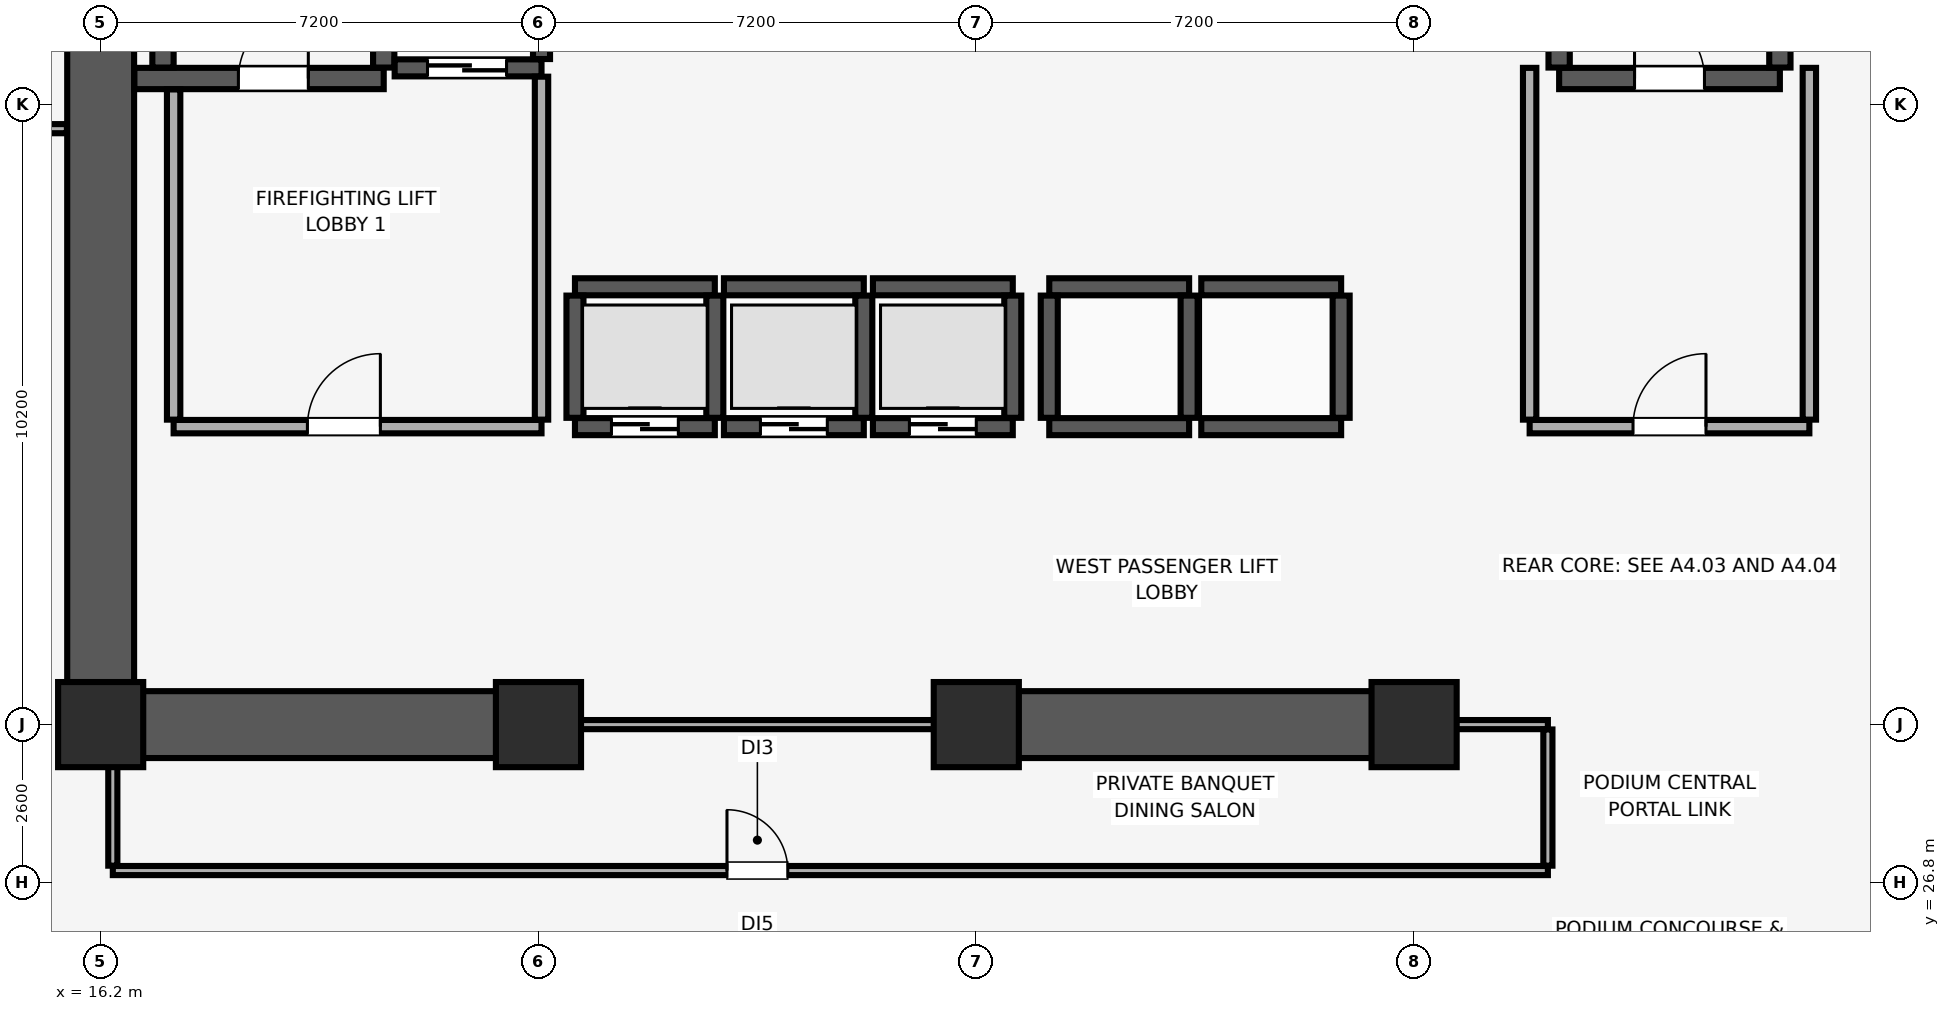
"""IFC4 building model, lengths in metres.
Left out: names, types, materials, properties, quantities, classifications, styles, units other than length and angle.
Written with IfcOpenShell. Run it as: python <this file> out.ifc"""

import sys

from ifc_helpers import new_model, si_unit, direction, frame, frame_2d, origin, origin_2d, place, context, subcontext, project, spatial, rectangle, extrude, element, fill, save


model = new_model("IFC4")
c1 = context("Model", 3, precision=1e-05, world=origin(), true_north=direction((0.0, 1.0)))
c2 = subcontext(c1, "Body", "Model", "MODEL_VIEW")
j1 = project(units=[si_unit("LENGTHUNIT", "METRE"), si_unit("PLANEANGLEUNIT", "RADIAN")], contexts=[c1])
p1 = place(None, origin())
s1 = spatial("IfcSite", under=j1, at=p1, CompositionType="ELEMENT")
p2 = place(p1, origin())
s2 = spatial("IfcBuilding", under=s1, at=p2, CompositionType="ELEMENT")
p3 = place(p2, frame((0.0, 0.0, 14.0)))
s3 = spatial("IfcBuildingStorey", under=s2, at=p3, CompositionType="ELEMENT", Elevation=14.0)
for number, where, z_axis, x_axis in (
    (1, (16.2, 29.4, 0.0), (0.0, 0.0, 1.0), (1.0, 0.0, 0.0)),
    (2, (23.4, 29.4, 0.0), (0.0, 0.0, 1.0), (1.0, 0.0, 0.0)),
    (3, (30.6, 29.4, 0.0), (0.0, 0.0, 1.0), (1.0, 0.0, 0.0)),
    (4, (37.8, 29.4, 0.0), (0.0, 0.0, 1.0), (1.0, 0.0, 0.0)),
):
    element("IfcColumn", number, at=place(p3, frame(where, z_axis=z_axis, x_axis=x_axis)), inside=s3, PredefinedType="COLUMN", context=c2, shape_type="SweptSolid", body=[
        extrude(rectangle(XDim=1.4, YDim=1.4, at=origin_2d()), origin(), (0.0, 0.0, 1.0), 5.08),
    ])
p4 = place(p3, frame((16.2, 29.4, 0.0), z_axis=(0.0, 0.0, 1.0), x_axis=(0.0, 1.0, 0.0)))
e5 = element("IfcWall", 5, at=p4, inside=s3, PredefinedType="SHEAR", context=c2, shape_type="SweptSolid", body=[
    extrude(rectangle(XDim=19.2, YDim=1.1, at=frame_2d((9.6, 0.0))), origin(), (0.0, 0.0, 1.0), 5.08),
])
p5 = place(p3, frame((16.755, 29.4, 0.0), z_axis=(0.0, 0.0, 1.0), x_axis=(1.0, 0.0, 0.0)))
e6 = element("IfcWall", 6, at=p5, inside=s3, PredefinedType="SHEAR", context=c2, shape_type="SweptSolid", body=[
    extrude(rectangle(XDim=6.845, YDim=1.1, at=frame_2d((3.423, 0.0))), origin(), (0.0, 0.0, 1.0), 5.08),
])
p6 = place(p3, frame((30.4, 29.4, 0.0), z_axis=(0.0, 0.0, 1.0), x_axis=(1.0, 0.0, 0.0)))
e7 = element("IfcWall", 7, at=p6, inside=s3, PredefinedType="SHEAR", context=c2, shape_type="SweptSolid", body=[
    extrude(rectangle(XDim=7.6, YDim=1.1, at=frame_2d((3.8, 0.0))), origin(), (0.0, 0.0, 1.0), 5.08),
])
p7 = place(p3, frame((16.755, 40.025, 0.0), z_axis=(0.0, 0.0, 1.0), x_axis=(1.0, 0.0, 0.0)))
e8 = element("IfcWall", 8, at=p7, inside=s3, PredefinedType="SHEAR", context=c2, shape_type="SweptSolid", body=[
    extrude(rectangle(XDim=4.1, YDim=0.35, at=frame_2d((2.05, 0.0))), origin(), (0.0, 0.0, 1.0), 5.08),
])
p8 = place(p7, frame((1.71, 0.0, 0.0)))
e9 = element("IfcOpeningElement", 9, at=p8, cuts=e8, PredefinedType="OPENING", context=c2, shape_type="SweptSolid", body=[
    extrude(rectangle(XDim=1.15, YDim=2.15, at=frame_2d((0.575, 1.075))), frame((0.0, 0.185, 0.0), z_axis=(0.0, -1.0, 0.0), x_axis=(1.0, 0.0, 0.0)), (0.0, 0.0, 1.0), 0.37),
])
for number, where, z_axis, x_axis in (
    (10, (17.225, 40.205, 0.0), (0.0, 0.0, 1.0), (0.0, 1.0, 0.0)),
    (11, (20.855, 40.205, 0.0), (0.0, 0.0, 1.0), (0.0, 1.0, 0.0)),
):
    element("IfcWall", number, at=place(p3, frame(where, z_axis=z_axis, x_axis=x_axis)), inside=s3, PredefinedType="SHEAR", context=c2, shape_type="SweptSolid", body=[
        extrude(rectangle(XDim=8.09, YDim=0.35, at=frame_2d((4.045, 0.0))), origin(), (0.0, 0.0, 1.0), 5.08),
    ])
p9 = place(p3, frame((40.185, 40.025, 0.0), z_axis=(0.0, 0.0, 1.0), x_axis=(1.0, 0.0, 0.0)))
e12 = element("IfcWall", 12, at=p9, inside=s3, PredefinedType="SHEAR", context=c2, shape_type="SweptSolid", body=[
    extrude(rectangle(XDim=3.63, YDim=0.35, at=frame_2d((1.815, 0.0))), origin(), (0.0, 0.0, 1.0), 5.08),
])
p10 = place(p9, frame((1.24, 0.0, 0.0)))
e13 = element("IfcOpeningElement", 13, at=p10, cuts=e12, PredefinedType="OPENING", context=c2, shape_type="SweptSolid", body=[
    extrude(rectangle(XDim=1.15, YDim=2.15, at=frame_2d((0.575, 1.075))), frame((0.0, 0.185, 0.0), z_axis=(0.0, -1.0, 0.0), x_axis=(1.0, 0.0, 0.0)), (0.0, 0.0, 1.0), 0.37),
])
for number, where, z_axis, x_axis in (
    (14, (40.185, 40.205, 0.0), (0.0, 0.0, 1.0), (0.0, 1.0, 0.0)),
    (15, (43.815, 40.205, 0.0), (0.0, 0.0, 1.0), (0.0, 1.0, 0.0)),
):
    element("IfcWall", number, at=place(p3, frame(where, z_axis=z_axis, x_axis=x_axis)), inside=s3, PredefinedType="SHEAR", context=c2, shape_type="SweptSolid", body=[
        extrude(rectangle(XDim=8.09, YDim=0.35, at=frame_2d((4.045, 0.0))), origin(), (0.0, 0.0, 1.0), 5.08),
    ])
p11 = place(p3, frame((24.0, 34.3, 0.0), z_axis=(0.0, 0.0, 1.0), x_axis=(1.0, 0.0, 0.0)))
e16 = element("IfcWall", 16, at=p11, inside=s3, PredefinedType="SHEAR", context=c2, shape_type="SweptSolid", body=[
    extrude(rectangle(XDim=2.3, YDim=0.28, at=frame_2d((1.15, 0.0))), origin(), (0.0, 0.0, 1.0), 5.08),
])
p12 = place(p11, frame((0.6, 0.0, 0.0)))
e17 = element("IfcOpeningElement", 17, at=p12, cuts=e16, PredefinedType="OPENING", context=c2, shape_type="SweptSolid", body=[
    extrude(rectangle(XDim=1.1, YDim=2.2, at=frame_2d((0.55, 1.1))), frame((0.0, 0.15, 0.0), z_axis=(0.0, -1.0, 0.0), x_axis=(1.0, 0.0, 0.0)), (0.0, 0.0, 1.0), 0.3),
])
p13 = place(p3, frame((24.0, 36.6, 0.0), z_axis=(0.0, 0.0, 1.0), x_axis=(1.0, 0.0, 0.0)))
e18 = element("IfcWall", 18, at=p13, inside=s3, PredefinedType="SHEAR", context=c2, shape_type="SweptSolid", body=[
    extrude(rectangle(XDim=2.3, YDim=0.28, at=frame_2d((1.15, 0.0))), origin(), (0.0, 0.0, 1.0), 5.08),
])
for number, where, z_axis, x_axis in (
    (19, (24.0, 34.445, 0.0), (0.0, 0.0, 1.0), (0.0, 1.0, 0.0)),
    (20, (26.3, 34.445, 0.0), (0.0, 0.0, 1.0), (0.0, 1.0, 0.0)),
):
    element("IfcWall", number, at=place(p3, frame(where, z_axis=z_axis, x_axis=x_axis)), inside=s3, PredefinedType="SHEAR", context=c2, shape_type="SweptSolid", body=[
        extrude(rectangle(XDim=2.01, YDim=0.28, at=frame_2d((1.005, 0.0))), origin(), (0.0, 0.0, 1.0), 5.08),
    ])
p14 = place(p3, frame((26.45, 34.3, 0.0), z_axis=(0.0, 0.0, 1.0), x_axis=(1.0, 0.0, 0.0)))
e21 = element("IfcWall", 21, at=p14, inside=s3, PredefinedType="SHEAR", context=c2, shape_type="SweptSolid", body=[
    extrude(rectangle(XDim=2.3, YDim=0.28, at=frame_2d((1.15, 0.0))), origin(), (0.0, 0.0, 1.0), 5.08),
])
p15 = place(p14, frame((0.6, 0.0, 0.0)))
e22 = element("IfcOpeningElement", 22, at=p15, cuts=e21, PredefinedType="OPENING", context=c2, shape_type="SweptSolid", body=[
    extrude(rectangle(XDim=1.1, YDim=2.2, at=frame_2d((0.55, 1.1))), frame((0.0, 0.15, 0.0), z_axis=(0.0, -1.0, 0.0), x_axis=(1.0, 0.0, 0.0)), (0.0, 0.0, 1.0), 0.3),
])
p16 = place(p3, frame((26.45, 36.6, 0.0), z_axis=(0.0, 0.0, 1.0), x_axis=(1.0, 0.0, 0.0)))
e23 = element("IfcWall", 23, at=p16, inside=s3, PredefinedType="SHEAR", context=c2, shape_type="SweptSolid", body=[
    extrude(rectangle(XDim=2.3, YDim=0.28, at=frame_2d((1.15, 0.0))), origin(), (0.0, 0.0, 1.0), 5.08),
])
p17 = place(p3, frame((28.75, 34.445, 0.0), z_axis=(0.0, 0.0, 1.0), x_axis=(0.0, 1.0, 0.0)))
e24 = element("IfcWall", 24, at=p17, inside=s3, PredefinedType="SHEAR", context=c2, shape_type="SweptSolid", body=[
    extrude(rectangle(XDim=2.01, YDim=0.28, at=frame_2d((1.005, 0.0))), origin(), (0.0, 0.0, 1.0), 5.08),
])
p18 = place(p3, frame((28.9, 34.3, 0.0), z_axis=(0.0, 0.0, 1.0), x_axis=(1.0, 0.0, 0.0)))
e25 = element("IfcWall", 25, at=p18, inside=s3, PredefinedType="SHEAR", context=c2, shape_type="SweptSolid", body=[
    extrude(rectangle(XDim=2.3, YDim=0.28, at=frame_2d((1.15, 0.0))), origin(), (0.0, 0.0, 1.0), 5.08),
])
p19 = place(p18, frame((0.6, 0.0, 0.0)))
e26 = element("IfcOpeningElement", 26, at=p19, cuts=e25, PredefinedType="OPENING", context=c2, shape_type="SweptSolid", body=[
    extrude(rectangle(XDim=1.1, YDim=2.2, at=frame_2d((0.55, 1.1))), frame((0.0, 0.15, 0.0), z_axis=(0.0, -1.0, 0.0), x_axis=(1.0, 0.0, 0.0)), (0.0, 0.0, 1.0), 0.3),
])
p20 = place(p3, frame((28.9, 36.6, 0.0), z_axis=(0.0, 0.0, 1.0), x_axis=(1.0, 0.0, 0.0)))
e27 = element("IfcWall", 27, at=p20, inside=s3, PredefinedType="SHEAR", context=c2, shape_type="SweptSolid", body=[
    extrude(rectangle(XDim=2.3, YDim=0.28, at=frame_2d((1.15, 0.0))), origin(), (0.0, 0.0, 1.0), 5.08),
])
p21 = place(p3, frame((31.2, 34.445, 0.0), z_axis=(0.0, 0.0, 1.0), x_axis=(0.0, 1.0, 0.0)))
e28 = element("IfcWall", 28, at=p21, inside=s3, PredefinedType="SHEAR", context=c2, shape_type="SweptSolid", body=[
    extrude(rectangle(XDim=2.01, YDim=0.28, at=frame_2d((1.005, 0.0))), origin(), (0.0, 0.0, 1.0), 5.08),
])
for number, where, z_axis, x_axis in (
    (29, (31.8, 34.3, 0.0), (0.0, 0.0, 1.0), (1.0, 0.0, 0.0)),
    (30, (31.8, 36.6, 0.0), (0.0, 0.0, 1.0), (1.0, 0.0, 0.0)),
):
    element("IfcWall", number, at=place(p3, frame(where, z_axis=z_axis, x_axis=x_axis)), inside=s3, PredefinedType="SHEAR", context=c2, shape_type="SweptSolid", body=[
        extrude(rectangle(XDim=2.3, YDim=0.28, at=frame_2d((1.15, 0.0))), origin(), (0.0, 0.0, 1.0), 5.08),
    ])
for number, where, z_axis, x_axis in (
    (31, (31.8, 34.445, 0.0), (0.0, 0.0, 1.0), (0.0, 1.0, 0.0)),
    (32, (34.1, 34.445, 0.0), (0.0, 0.0, 1.0), (0.0, 1.0, 0.0)),
):
    element("IfcWall", number, at=place(p3, frame(where, z_axis=z_axis, x_axis=x_axis)), inside=s3, PredefinedType="SHEAR", context=c2, shape_type="SweptSolid", body=[
        extrude(rectangle(XDim=2.01, YDim=0.28, at=frame_2d((1.005, 0.0))), origin(), (0.0, 0.0, 1.0), 5.08),
    ])
for number, where, z_axis, x_axis in (
    (33, (34.3, 34.3, 0.0), (0.0, 0.0, 1.0), (1.0, 0.0, 0.0)),
    (34, (34.3, 36.6, 0.0), (0.0, 0.0, 1.0), (1.0, 0.0, 0.0)),
):
    element("IfcWall", number, at=place(p3, frame(where, z_axis=z_axis, x_axis=x_axis)), inside=s3, PredefinedType="SHEAR", context=c2, shape_type="SweptSolid", body=[
        extrude(rectangle(XDim=2.3, YDim=0.28, at=frame_2d((1.15, 0.0))), origin(), (0.0, 0.0, 1.0), 5.08),
    ])
p22 = place(p3, frame((36.6, 34.445, 0.0), z_axis=(0.0, 0.0, 1.0), x_axis=(0.0, 1.0, 0.0)))
e35 = element("IfcWall", 35, at=p22, inside=s3, PredefinedType="SHEAR", context=c2, shape_type="SweptSolid", body=[
    extrude(rectangle(XDim=2.01, YDim=0.28, at=frame_2d((1.005, 0.0))), origin(), (0.0, 0.0, 1.0), 5.08),
])
p23 = place(p3, frame((21.035, 40.2, 0.0), z_axis=(0.0, 0.0, 1.0), x_axis=(1.0, 0.0, 0.0)))
e36 = element("IfcWall", 36, at=p23, inside=s3, PredefinedType="SHEAR", context=c2, shape_type="SweptSolid", body=[
    extrude(rectangle(XDim=2.415, YDim=0.28, at=frame_2d((1.208, 0.0))), origin(), (0.0, 0.0, 1.0), 5.08),
])
p24 = place(p23, frame((0.54, 0.0, 0.0)))
e37 = element("IfcOpeningElement", 37, at=p24, cuts=e36, PredefinedType="OPENING", context=c2, shape_type="SweptSolid", body=[
    extrude(rectangle(XDim=1.3, YDim=2.3, at=frame_2d((0.65, 1.15))), frame((0.0, 0.15, 0.0), z_axis=(0.0, -1.0, 0.0), x_axis=(1.0, 0.0, 0.0)), (0.0, 0.0, 1.0), 0.3),
])
p25 = place(p3, frame((23.45, 40.345, 0.0), z_axis=(0.0, 0.0, 1.0), x_axis=(0.0, 1.0, 0.0)))
e38 = element("IfcWall", 38, at=p25, inside=s3, PredefinedType="SHEAR", context=c2, shape_type="SweptSolid", body=[
    extrude(rectangle(XDim=2.81, YDim=0.28, at=frame_2d((1.405, 0.0))), origin(), (0.0, 0.0, 1.0), 5.08),
])
p26 = place(p3, frame((17.4, 34.3, 0.0), z_axis=(0.0, 0.0, 1.0), x_axis=(1.0, 0.0, 0.0)))
e39 = element("IfcWall", 39, at=p26, inside=s3, PredefinedType="PARTITIONING", context=c2, shape_type="SweptSolid", body=[
    extrude(rectangle(XDim=6.05, YDim=0.22, at=frame_2d((3.025, 0.0))), origin(), (0.0, 0.0, 1.0), 5.08),
])
p27 = place(p26, frame((2.2, 0.0, 0.0)))
e40 = element("IfcOpeningElement", 40, at=p27, cuts=e39, PredefinedType="OPENING", context=c2, shape_type="SweptSolid", body=[
    extrude(rectangle(XDim=1.2, YDim=2.15, at=frame_2d((0.6, 1.075))), frame((0.0, 0.12, 0.0), z_axis=(0.0, -1.0, 0.0), x_axis=(1.0, 0.0, 0.0)), (0.0, 0.0, 1.0), 0.24),
])
p28 = place(p3, frame((17.4, 34.415, 0.0), z_axis=(0.0, 0.0, 1.0), x_axis=(0.0, 1.0, 0.0)))
e41 = element("IfcWall", 41, at=p28, inside=s3, PredefinedType="PARTITIONING", context=c2, shape_type="SweptSolid", body=[
    extrude(rectangle(XDim=5.43, YDim=0.22, at=frame_2d((2.715, 0.0))), origin(), (0.0, 0.0, 1.0), 5.08),
])
p29 = place(p3, frame((23.45, 34.415, 0.0), z_axis=(0.0, 0.0, 1.0), x_axis=(0.0, 1.0, 0.0)))
e42 = element("IfcWall", 42, at=p29, inside=s3, PredefinedType="PARTITIONING", context=c2, shape_type="SweptSolid", body=[
    extrude(rectangle(XDim=5.64, YDim=0.22, at=frame_2d((2.82, 0.0))), origin(), (0.0, 0.0, 1.0), 5.08),
])
p30 = place(p3, frame((39.7, 34.3, 0.0), z_axis=(0.0, 0.0, 1.0), x_axis=(1.0, 0.0, 0.0)))
e43 = element("IfcWall", 43, at=p30, inside=s3, PredefinedType="PARTITIONING", context=c2, shape_type="SweptSolid", body=[
    extrude(rectangle(XDim=4.6, YDim=0.22, at=frame_2d((2.3, 0.0))), origin(), (0.0, 0.0, 1.0), 5.08),
])
p31 = place(p30, frame((1.7, 0.0, 0.0)))
e44 = element("IfcOpeningElement", 44, at=p31, cuts=e43, PredefinedType="OPENING", context=c2, shape_type="SweptSolid", body=[
    extrude(rectangle(XDim=1.2, YDim=2.15, at=frame_2d((0.6, 1.075))), frame((0.0, 0.12, 0.0), z_axis=(0.0, -1.0, 0.0), x_axis=(1.0, 0.0, 0.0)), (0.0, 0.0, 1.0), 0.24),
])
for number, where, z_axis, x_axis in (
    (45, (39.7, 34.415, 0.0), (0.0, 0.0, 1.0), (0.0, 1.0, 0.0)),
    (46, (44.3, 34.415, 0.0), (0.0, 0.0, 1.0), (0.0, 1.0, 0.0)),
):
    element("IfcWall", number, at=place(p3, frame(where, z_axis=z_axis, x_axis=x_axis)), inside=s3, PredefinedType="PARTITIONING", context=c2, shape_type="SweptSolid", body=[
        extrude(rectangle(XDim=5.785, YDim=0.22, at=frame_2d((2.893, 0.0))), origin(), (0.0, 0.0, 1.0), 5.08),
    ])
p32 = place(p3, frame((13.465, 39.2, 0.0), z_axis=(0.0, 0.0, 1.0), x_axis=(1.0, 0.0, 0.0)))
e47 = element("IfcWall", 47, at=p32, inside=s3, PredefinedType="PARTITIONING", context=c2, shape_type="SweptSolid", body=[
    extrude(rectangle(XDim=2.18, YDim=0.15, at=frame_2d((1.09, 0.0))), origin(), (0.0, 0.0, 1.0), 5.08),
])
p33 = place(p3, frame((16.4, 27.0, 0.0), z_axis=(0.0, 0.0, 1.0), x_axis=(1.0, 0.0, 0.0)))
e48 = element("IfcWall", 48, at=p33, inside=s3, PredefinedType="PARTITIONING", context=c2, shape_type="SweptSolid", body=[
    extrude(rectangle(XDim=23.6, YDim=0.15, at=frame_2d((11.8, 0.0))), origin(), (0.0, 0.0, 1.0), 5.08),
])
p34 = place(p33, frame((10.1, 0.0, 0.0)))
e49 = element("IfcOpeningElement", 49, at=p34, cuts=e48, PredefinedType="OPENING", context=c2, shape_type="SweptSolid", body=[
    extrude(rectangle(XDim=1.0, YDim=2.15, at=frame_2d((0.5, 1.075))), frame((0.0, 0.085, 0.0), z_axis=(0.0, -1.0, 0.0), x_axis=(1.0, 0.0, 0.0)), (0.0, 0.0, 1.0), 0.17),
])
p35 = place(p3, frame((23.61, 29.4, 0.0), z_axis=(0.0, 0.0, 1.0), x_axis=(1.0, 0.0, 0.0)))
e50 = element("IfcWall", 50, at=p35, inside=s3, PredefinedType="PARTITIONING", context=c2, shape_type="SweptSolid", body=[
    extrude(rectangle(XDim=6.78, YDim=0.15, at=frame_2d((3.39, 0.0))), origin(), (0.0, 0.0, 1.0), 3.98),
])
p36 = place(p3, frame((38.01, 29.4, 0.0), z_axis=(0.0, 0.0, 1.0), x_axis=(1.0, 0.0, 0.0)))
e51 = element("IfcWall", 51, at=p36, inside=s3, PredefinedType="PARTITIONING", context=c2, shape_type="SweptSolid", body=[
    extrude(rectangle(XDim=1.99, YDim=0.15, at=frame_2d((0.995, 0.0))), origin(), (0.0, 0.0, 1.0), 3.98),
])
p37 = place(p3, frame((16.4, 27.08, 0.0), z_axis=(0.0, 0.0, 1.0), x_axis=(0.0, 1.0, 0.0)))
e52 = element("IfcWall", 52, at=p37, inside=s3, PredefinedType="PARTITIONING", context=c2, shape_type="SweptSolid", body=[
    extrude(rectangle(XDim=2.31, YDim=0.15, at=frame_2d((1.155, 0.0))), origin(), (0.0, 0.0, 1.0), 4.48),
])
p38 = place(p3, frame((40.0, 27.08, 0.0), z_axis=(0.0, 0.0, 1.0), x_axis=(0.0, 1.0, 0.0)))
e53 = element("IfcWall", 53, at=p38, inside=s3, PredefinedType="PARTITIONING", context=c2, shape_type="SweptSolid", body=[
    extrude(rectangle(XDim=2.24, YDim=0.15, at=frame_2d((1.12, 0.0))), origin(), (0.0, 0.0, 1.0), 5.08),
])
p39 = place(p8, origin())
e54 = element("IfcDoor", 54, at=p39, inside=s3, OperationType="SINGLE_SWING_RIGHT", PredefinedType="DOOR", context=c2, shape_type="SweptSolid", body=[
    extrude(rectangle(XDim=1.15, YDim=2.15, at=frame_2d((0.575, 1.075))), frame((0.0, 0.025, 0.0), z_axis=(0.0, -1.0, 0.0), x_axis=(1.0, 0.0, 0.0)), (0.0, 0.0, 1.0), 0.05),
])
fill(e9, e54)
p40 = place(p10, origin())
e55 = element("IfcDoor", 55, at=p40, inside=s3, OperationType="SINGLE_SWING_LEFT", PredefinedType="DOOR", context=c2, shape_type="SweptSolid", body=[
    extrude(rectangle(XDim=1.15, YDim=2.15, at=frame_2d((0.575, 1.075))), frame((0.0, 0.025, 0.0), z_axis=(0.0, -1.0, 0.0), x_axis=(1.0, 0.0, 0.0)), (0.0, 0.0, 1.0), 0.05),
])
fill(e13, e55)
p41 = place(p12, origin())
e56 = element("IfcDoor", 56, at=p41, inside=s3, OperationType="DOUBLE_DOOR_SLIDING", PredefinedType="DOOR", context=c2, shape_type="SweptSolid", body=[
    extrude(rectangle(XDim=1.1, YDim=2.2, at=frame_2d((0.55, 1.1))), frame((0.0, 0.025, 0.0), z_axis=(0.0, -1.0, 0.0), x_axis=(1.0, 0.0, 0.0)), (0.0, 0.0, 1.0), 0.05),
])
fill(e17, e56)
p42 = place(p15, origin())
e57 = element("IfcDoor", 57, at=p42, inside=s3, OperationType="DOUBLE_DOOR_SLIDING", PredefinedType="DOOR", context=c2, shape_type="SweptSolid", body=[
    extrude(rectangle(XDim=1.1, YDim=2.2, at=frame_2d((0.55, 1.1))), frame((0.0, 0.025, 0.0), z_axis=(0.0, -1.0, 0.0), x_axis=(1.0, 0.0, 0.0)), (0.0, 0.0, 1.0), 0.05),
])
fill(e22, e57)
p43 = place(p19, origin())
e58 = element("IfcDoor", 58, at=p43, inside=s3, OperationType="DOUBLE_DOOR_SLIDING", PredefinedType="DOOR", context=c2, shape_type="SweptSolid", body=[
    extrude(rectangle(XDim=1.1, YDim=2.2, at=frame_2d((0.55, 1.1))), frame((0.0, 0.025, 0.0), z_axis=(0.0, -1.0, 0.0), x_axis=(1.0, 0.0, 0.0)), (0.0, 0.0, 1.0), 0.05),
])
fill(e26, e58)
p44 = place(p24, origin())
e59 = element("IfcDoor", 59, at=p44, inside=s3, OperationType="DOUBLE_DOOR_SLIDING", PredefinedType="DOOR", context=c2, shape_type="SweptSolid", body=[
    extrude(rectangle(XDim=1.3, YDim=2.3, at=frame_2d((0.65, 1.15))), frame((0.0, 0.025, 0.0), z_axis=(0.0, -1.0, 0.0), x_axis=(1.0, 0.0, 0.0)), (0.0, 0.0, 1.0), 0.05),
])
fill(e37, e59)
p45 = place(p27, origin())
e60 = element("IfcDoor", 60, at=p45, inside=s3, OperationType="SINGLE_SWING_RIGHT", PredefinedType="DOOR", context=c2, shape_type="SweptSolid", body=[
    extrude(rectangle(XDim=1.2, YDim=2.15, at=frame_2d((0.6, 1.075))), frame((0.0, 0.025, 0.0), z_axis=(0.0, -1.0, 0.0), x_axis=(1.0, 0.0, 0.0)), (0.0, 0.0, 1.0), 0.05),
])
fill(e40, e60)
p46 = place(p31, origin())
e61 = element("IfcDoor", 61, at=p46, inside=s3, OperationType="SINGLE_SWING_RIGHT", PredefinedType="DOOR", context=c2, shape_type="SweptSolid", body=[
    extrude(rectangle(XDim=1.2, YDim=2.15, at=frame_2d((0.6, 1.075))), frame((0.0, 0.025, 0.0), z_axis=(0.0, -1.0, 0.0), x_axis=(1.0, 0.0, 0.0)), (0.0, 0.0, 1.0), 0.05),
])
fill(e44, e61)
p47 = place(p34, origin())
e62 = element("IfcDoor", 62, at=p47, inside=s3, OperationType="SINGLE_SWING_LEFT", PredefinedType="DOOR", context=c2, shape_type="SweptSolid", body=[
    extrude(rectangle(XDim=1.0, YDim=2.15, at=frame_2d((0.5, 1.075))), frame((0.0, 0.025, 0.0), z_axis=(0.0, -1.0, 0.0), x_axis=(1.0, 0.0, 0.0)), (0.0, 0.0, 1.0), 0.05),
])
fill(e49, e62)
save(model, sys.argv[1])
